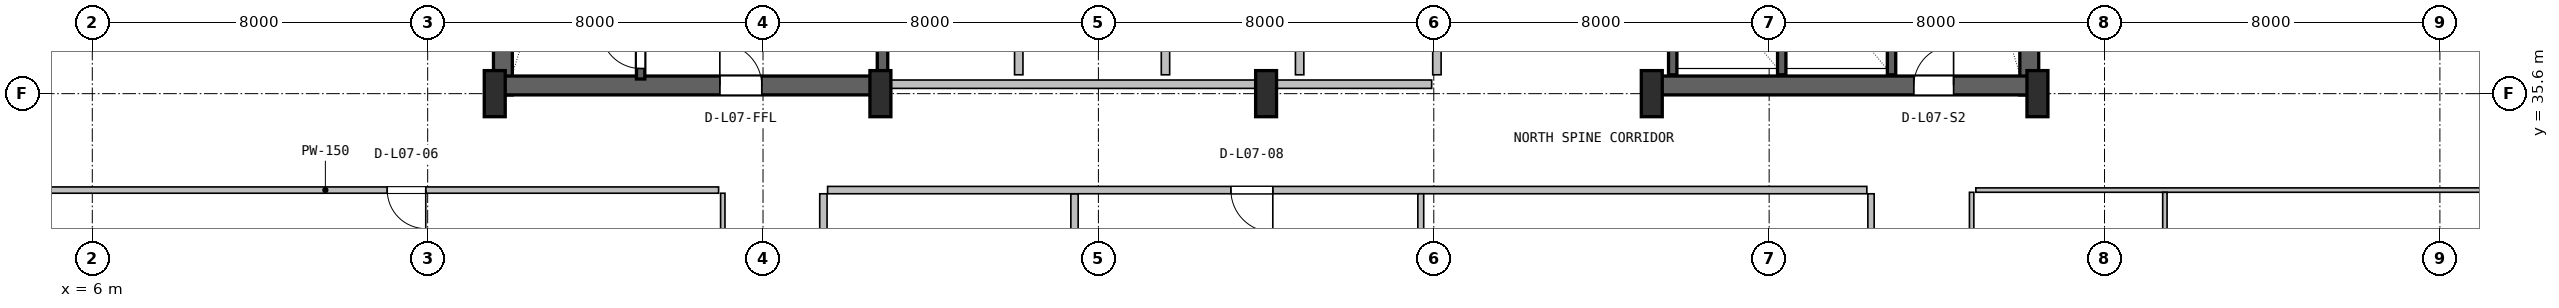
"""IFC4 building model, lengths in metres.
Left out: names, types, materials, properties, quantities, classifications, styles, units other than length and angle.
Written with IfcOpenShell. Run it as: python <this file> out.ifc"""

import sys

from ifc_helpers import new_model, si_unit, direction, frame, frame_2d, origin, origin_2d, place, context, subcontext, project, spatial, rectangle, i_section, extrude, source, transform, mapped, element, fill, save


model = new_model("IFC4")
c1 = context("Model", 3, precision=1e-05, world=origin(), true_north=direction((0.0, 1.0)))
c2 = subcontext(c1, "Body", "Model", "MODEL_VIEW")
j1 = project(units=[si_unit("LENGTHUNIT", "METRE"), si_unit("PLANEANGLEUNIT", "RADIAN")], contexts=[c1])
p1 = place(None, origin())
s1 = spatial("IfcSite", under=j1, at=p1, CompositionType="ELEMENT")
p2 = place(p1, origin())
s2 = spatial("IfcBuilding", under=s1, at=p2, CompositionType="ELEMENT")
p3 = place(p2, frame((0.0, 0.0, 35.4)))
s3 = spatial("IfcBuildingStorey", under=s2, at=p3, CompositionType="ELEMENT", Elevation=35.4)
for number, where, z_axis, x_axis in (
    (1, (15.795, 35.57, 0.0), (0.0, 0.0, 1.0), (0.0, 1.0, 0.0)),
    (2, (52.205, 35.57, 0.0), (0.0, 0.0, 1.0), (0.0, 1.0, 0.0)),
):
    element("IfcWall", number, at=place(p3, frame(where, z_axis=z_axis, x_axis=x_axis)), inside=s3, PredefinedType="SHEAR", context=c2, shape_type="SweptSolid", body=[
        extrude(rectangle(XDim=11.23, YDim=0.45, at=frame_2d((5.615, 0.0))), origin(), (0.0, 0.0, 1.0), 3.65),
    ])
p4 = place(p3, frame((15.57, 35.795, 0.0), z_axis=(0.0, 0.0, 1.0), x_axis=(1.0, 0.0, 0.0)))
e3 = element("IfcWall", 3, at=p4, inside=s3, PredefinedType="SHEAR", context=c2, shape_type="SweptSolid", body=[
    extrude(rectangle(XDim=9.23, YDim=0.45, at=frame_2d((4.615, 0.0))), origin(), (0.0, 0.0, 1.0), 3.65),
])
p5 = place(p4, frame((5.4, 0.0, 0.0)))
e4 = element("IfcOpeningElement", 4, at=p5, cuts=e3, PredefinedType="OPENING", context=c2, shape_type="SweptSolid", body=[
    extrude(rectangle(XDim=1.0, YDim=2.1, at=frame_2d((0.5, 1.05))), frame((0.0, 0.235, 0.0), z_axis=(0.0, -1.0, 0.0), x_axis=(1.0, 0.0, 0.0)), (0.0, 0.0, 1.0), 0.47),
])
p6 = place(p3, frame((43.2, 35.795, 0.0), z_axis=(0.0, 0.0, 1.0), x_axis=(1.0, 0.0, 0.0)))
e5 = element("IfcWall", 5, at=p6, inside=s3, PredefinedType="SHEAR", context=c2, shape_type="SweptSolid", body=[
    extrude(rectangle(XDim=9.23, YDim=0.45, at=frame_2d((4.615, 0.0))), origin(), (0.0, 0.0, 1.0), 3.65),
])
p7 = place(p6, frame((6.25, 0.0, 0.0)))
e6 = element("IfcOpeningElement", 6, at=p7, cuts=e5, PredefinedType="OPENING", context=c2, shape_type="SweptSolid", body=[
    extrude(rectangle(XDim=0.95, YDim=2.1, at=frame_2d((0.475, 1.05))), frame((0.0, 0.235, 0.0), z_axis=(0.0, -1.0, 0.0), x_axis=(1.0, 0.0, 0.0)), (0.0, 0.0, 1.0), 0.47),
])
m1 = source(origin(), c2, "Body", "SweptSolid", [
    extrude(i_section(OverallWidth=0.5, OverallDepth=1.1, WebThickness=0.018, FlangeThickness=0.032, FilletRadius=0.018, at=origin_2d()), origin(), (0.0, 0.0, 1.0), 3.9),
])
for number, where, z_axis, x_axis in (
    (7, (15.6, 35.6, 0.0), (0.0, 0.0, 1.0), (1.0, 0.0, 0.0)),
    (8, (24.8, 35.6, 0.0), (0.0, 0.0, 1.0), (1.0, 0.0, 0.0)),
    (9, (34.0, 35.6, 0.0), (0.0, 0.0, 1.0), (1.0, 0.0, 0.0)),
    (10, (43.2, 35.6, 0.0), (0.0, 0.0, 1.0), (1.0, 0.0, 0.0)),
    (11, (52.4, 35.6, 0.0), (0.0, 0.0, 1.0), (1.0, 0.0, 0.0)),
):
    element("IfcColumn", number, at=place(p3, frame(where, z_axis=z_axis, x_axis=x_axis)), inside=s3, PredefinedType="COLUMN", context=c2, shape_type="MappedRepresentation", body=[
        mapped(m1, transform((0.0, 0.0, 0.0), x_axis=(1.0, 0.0, 0.0), y_axis=(0.0, 1.0, 0.0), z_axis=(0.0, 0.0, 1.0), scale=1.0)),
    ])
p8 = place(p3, frame((19.08, 35.95, 0.0), z_axis=(0.0, 0.0, 1.0), x_axis=(0.0, 1.0, 0.0)))
e12 = element("IfcWall", 12, at=p8, inside=s3, PredefinedType="SHEAR", context=c2, shape_type="SweptSolid", body=[
    extrude(rectangle(XDim=9.65, YDim=0.2, at=frame_2d((4.825, 0.0))), origin(), (0.0, 0.0, 1.0), 3.65),
])
p9 = place(p8, frame((0.25, 0.0, 0.0)))
e13 = element("IfcOpeningElement", 13, at=p9, cuts=e12, PredefinedType="OPENING", context=c2, shape_type="SweptSolid", body=[
    extrude(rectangle(XDim=0.95, YDim=2.1, at=frame_2d((0.475, 1.05))), frame((0.0, 0.11, 0.0), z_axis=(0.0, -1.0, 0.0), x_axis=(1.0, 0.0, 0.0)), (0.0, 0.0, 1.0), 0.22),
])
p10 = place(p3, frame((24.85, 36.05, 0.0), z_axis=(0.0, 0.0, 1.0), x_axis=(0.0, 1.0, 0.0)))
e14 = element("IfcWall", 14, at=p10, inside=s3, PredefinedType="SHEAR", context=c2, shape_type="SweptSolid", body=[
    extrude(rectangle(XDim=10.45, YDim=0.25, at=frame_2d((5.225, 0.0))), origin(), (0.0, 0.0, 1.0), 3.65),
])
p11 = place(p3, frame((48.92, 36.05, 0.0), z_axis=(0.0, 0.0, 1.0), x_axis=(0.0, 1.0, 0.0)))
e15 = element("IfcWall", 15, at=p11, inside=s3, PredefinedType="SHEAR", context=c2, shape_type="SweptSolid", body=[
    extrude(rectangle(XDim=10.5, YDim=0.2, at=frame_2d((5.25, 0.0))), origin(), (0.0, 0.0, 1.0), 3.65),
])
for number, where, z_axis, x_axis in (
    (16, (43.7, 36.05, 0.0), (0.0, 0.0, 1.0), (0.0, 1.0, 0.0)),
    (17, (46.3, 36.05, 0.0), (0.0, 0.0, 1.0), (0.0, 1.0, 0.0)),
):
    element("IfcWall", number, at=place(p3, frame(where, z_axis=z_axis, x_axis=x_axis)), inside=s3, PredefinedType="SHEAR", context=c2, shape_type="SweptSolid", body=[
        extrude(rectangle(XDim=3.05, YDim=0.2, at=frame_2d((1.525, 0.0))), origin(), (0.0, 0.0, 1.0), 3.65),
    ])
p12 = place(p3, frame((25.0, 35.825, 0.0), z_axis=(0.0, 0.0, 1.0), x_axis=(1.0, 0.0, 0.0)))
e18 = element("IfcWall", 18, at=p12, inside=s3, PredefinedType="SOLIDWALL", context=c2, shape_type="SweptSolid", body=[
    extrude(rectangle(XDim=12.95, YDim=0.2, at=frame_2d((6.475, 0.0))), origin(), (0.0, 0.0, 1.0), 2.425),
])
for number, where, z_axis, x_axis in (
    (19, (28.1, 36.05, 0.0), (0.0, 0.0, 1.0), (0.0, 1.0, 0.0)),
    (20, (31.6, 36.05, 0.0), (0.0, 0.0, 1.0), (0.0, 1.0, 0.0)),
):
    element("IfcWall", number, at=place(p3, frame(where, z_axis=z_axis, x_axis=x_axis)), inside=s3, PredefinedType="PLUMBINGWALL", context=c2, shape_type="SweptSolid", body=[
        extrude(rectangle(XDim=3.1, YDim=0.2, at=frame_2d((1.55, 0.0))), origin(), (0.0, 0.0, 1.0), 3.63),
    ])
for number, where, z_axis, x_axis in (
    (21, (34.8, 36.05, 0.0), (0.0, 0.0, 1.0), (0.0, 1.0, 0.0)),
    (22, (38.075, 36.05, 0.0), (0.0, 0.0, 1.0), (0.0, 1.0, 0.0)),
):
    element("IfcWall", number, at=place(p3, frame(where, z_axis=z_axis, x_axis=x_axis)), inside=s3, PredefinedType="SOLIDWALL", context=c2, shape_type="SweptSolid", body=[
        extrude(rectangle(XDim=3.1, YDim=0.2, at=frame_2d((1.55, 0.0))), origin(), (0.0, 0.0, 1.0), 3.63),
    ])
p13 = place(p3, frame((21.04, 2.55, 0.0), z_axis=(0.0, 0.0, 1.0), x_axis=(0.0, 1.0, 0.0)))
e23 = element("IfcWall", 23, at=p13, inside=s3, PredefinedType="PARTITIONING", context=c2, shape_type="SweptSolid", body=[
    extrude(rectangle(XDim=30.675, YDim=0.105, at=frame_2d((15.337, 0.0))), origin(), (0.0, 0.0, 1.0), 3.322),
])
p14 = place(p13, frame((8.575, 0.0, 0.0)))
e24 = element("IfcOpeningElement", 24, at=p14, cuts=e23, PredefinedType="OPENING", context=c2, shape_type="SweptSolid", body=[
    extrude(rectangle(XDim=0.88, YDim=2.06, at=frame_2d((0.44, 1.03))), frame((0.0, 0.062, 0.0), z_axis=(0.0, -1.0, 0.0), x_axis=(1.0, 0.0, 0.0)), (0.0, 0.0, 1.0), 0.125),
])
p15 = place(p3, frame((2.18, 33.3, 0.0), z_axis=(0.0, 0.0, 1.0), x_axis=(1.0, 0.0, 0.0)))
e25 = element("IfcWall", 25, at=p15, inside=s3, PredefinedType="PARTITIONING", context=c2, shape_type="SweptSolid", body=[
    extrude(rectangle(XDim=18.76, YDim=0.15, at=frame_2d((9.38, 0.0))), origin(), (0.0, 0.0, 1.0), 3.208),
])
p16 = place(p15, frame((10.855, 0.0, 0.0)))
e26 = element("IfcOpeningElement", 26, at=p16, cuts=e25, PredefinedType="OPENING", context=c2, shape_type="SweptSolid", body=[
    extrude(rectangle(XDim=0.92, YDim=2.08, at=frame_2d((0.46, 1.04))), frame((0.0, 0.085, 0.0), z_axis=(0.0, -1.0, 0.0), x_axis=(1.0, 0.0, 0.0)), (0.0, 0.0, 1.0), 0.17),
])
p17 = place(p3, frame((29.43, 1.38, 0.0), z_axis=(0.0, 0.0, 1.0), x_axis=(0.0, 1.0, 0.0)))
e27 = element("IfcWall", 27, at=p17, inside=s3, PredefinedType="PARTITIONING", context=c2, shape_type="SweptSolid", body=[
    extrude(rectangle(XDim=31.832, YDim=0.175, at=frame_2d((15.916, 0.0))), origin(), (0.0, 0.0, 1.0), 2.852),
])
p18 = place(p3, frame((23.54, 33.3, 0.0), z_axis=(0.0, 0.0, 1.0), x_axis=(1.0, 0.0, 0.0)))
e28 = element("IfcWall", 28, at=p18, inside=s3, PredefinedType="PARTITIONING", context=c2, shape_type="SweptSolid", body=[
    extrude(rectangle(XDim=24.79, YDim=0.175, at=frame_2d((12.395, 0.0))), origin(), (0.0, 0.0, 1.0), 2.852),
])
p19 = place(p18, frame((9.62, 0.0, 0.0)))
e29 = element("IfcOpeningElement", 29, at=p19, cuts=e28, PredefinedType="OPENING", context=c2, shape_type="SweptSolid", body=[
    extrude(rectangle(XDim=1.0, YDim=2.1, at=frame_2d((0.5, 1.05))), frame((0.0, 0.098, 0.0), z_axis=(0.0, -1.0, 0.0), x_axis=(1.0, 0.0, 0.0)), (0.0, 0.0, 1.0), 0.195),
])
p20 = place(p3, frame((23.44, 1.38, 0.0), z_axis=(0.0, 0.0, 1.0), x_axis=(0.0, 1.0, 0.0)))
e30 = element("IfcWall", 30, at=p20, inside=s3, PredefinedType="PARTITIONING", context=c2, shape_type="SweptSolid", body=[
    extrude(rectangle(XDim=31.832, YDim=0.175, at=frame_2d((15.916, 0.0))), origin(), (0.0, 0.0, 1.0), 3.208),
])
p21 = place(p20, frame((15.915, 0.0, 0.0)))
e31 = element("IfcOpeningElement", 31, at=p21, cuts=e30, PredefinedType="OPENING", context=c2, shape_type="SweptSolid", body=[
    extrude(rectangle(XDim=1.05, YDim=2.1, at=frame_2d((0.525, 1.05))), frame((0.0, 0.098, 0.0), z_axis=(0.0, -1.0, 0.0), x_axis=(1.0, 0.0, 0.0)), (0.0, 0.0, 1.0), 0.195),
])
p22 = place(p3, frame((37.69, 1.38, 0.0), z_axis=(0.0, 0.0, 1.0), x_axis=(0.0, 1.0, 0.0)))
e32 = element("IfcWall", 32, at=p22, inside=s3, PredefinedType="PARTITIONING", context=c2, shape_type="SweptSolid", body=[
    extrude(rectangle(XDim=31.832, YDim=0.14, at=frame_2d((15.916, 0.0))), origin(), (0.0, 0.0, 1.0), 2.852),
])
p23 = place(p3, frame((48.43, 2.55, 0.0), z_axis=(0.0, 0.0, 1.0), x_axis=(0.0, 1.0, 0.0)))
e33 = element("IfcWall", 33, at=p23, inside=s3, PredefinedType="PARTITIONING", context=c2, shape_type="SweptSolid", body=[
    extrude(rectangle(XDim=30.662, YDim=0.15, at=frame_2d((15.331, 0.0))), origin(), (0.0, 0.0, 1.0), 3.322),
])
p24 = place(p23, frame((14.885, 0.0, 0.0)))
e34 = element("IfcOpeningElement", 34, at=p24, cuts=e33, PredefinedType="OPENING", context=c2, shape_type="SweptSolid", body=[
    extrude(rectangle(XDim=0.88, YDim=2.06, at=frame_2d((0.44, 1.03))), frame((0.0, 0.085, 0.0), z_axis=(0.0, -1.0, 0.0), x_axis=(1.0, 0.0, 0.0)), (0.0, 0.0, 1.0), 0.17),
])
p25 = place(p3, frame((50.93, 33.3, 0.0), z_axis=(0.0, 0.0, 1.0), x_axis=(1.0, 0.0, 0.0)))
e35 = element("IfcWall", 35, at=p25, inside=s3, PredefinedType="PARTITIONING", context=c2, shape_type="SweptSolid", body=[
    extrude(rectangle(XDim=14.89, YDim=0.105, at=frame_2d((7.445, 0.0))), origin(), (0.0, 0.0, 1.0), 3.208),
])
p26 = place(p3, frame((55.44, 20.632, 0.0), z_axis=(0.0, 0.0, 1.0), x_axis=(0.0, 1.0, 0.0)))
e36 = element("IfcWall", 36, at=p26, inside=s3, PredefinedType="PARTITIONING", context=c2, shape_type="SweptSolid", body=[
    extrude(rectangle(XDim=12.615, YDim=0.105, at=frame_2d((6.308, 0.0))), origin(), (0.0, 0.0, 1.0), 3.322),
])
p27 = place(p3, frame((50.83, 1.38, 0.0), z_axis=(0.0, 0.0, 1.0), x_axis=(0.0, 1.0, 0.0)))
e37 = element("IfcWall", 37, at=p27, inside=s3, PredefinedType="PARTITIONING", context=c2, shape_type="SweptSolid", body=[
    extrude(rectangle(XDim=31.867, YDim=0.105, at=frame_2d((15.934, 0.0))), origin(), (0.0, 0.0, 1.0), 3.208),
])
p28 = place(p27, frame((9.69, 0.0, 0.0)))
e38 = element("IfcOpeningElement", 38, at=p28, cuts=e37, PredefinedType="OPENING", context=c2, shape_type="SweptSolid", body=[
    extrude(rectangle(XDim=0.88, YDim=2.06, at=frame_2d((0.44, 1.03))), frame((0.0, 0.062, 0.0), z_axis=(0.0, -1.0, 0.0), x_axis=(1.0, 0.0, 0.0)), (0.0, 0.0, 1.0), 0.125),
])
p29 = place(p27, frame((25.11, 0.0, 0.0)))
e39 = element("IfcOpeningElement", 39, at=p29, cuts=e37, PredefinedType="OPENING", context=c2, shape_type="SweptSolid", body=[
    extrude(rectangle(XDim=1.0, YDim=2.1, at=frame_2d((0.5, 1.05))), frame((0.0, 0.062, 0.0), z_axis=(0.0, -1.0, 0.0), x_axis=(1.0, 0.0, 0.0)), (0.0, 0.0, 1.0), 0.125),
])
m2 = source(origin(), c2, "Body", "SweptSolid", [
    extrude(rectangle(XDim=0.95, YDim=2.1, at=frame_2d((0.475, 1.05))), frame((0.0, 0.025, 0.0), z_axis=(0.0, -1.0, 0.0), x_axis=(1.0, 0.0, 0.0)), (0.0, 0.0, 1.0), 0.05),
])
p30 = place(p9, origin())
e40 = element("IfcDoor", 40, at=p30, inside=s3, OperationType="SINGLE_SWING_RIGHT", PredefinedType="DOOR", context=c2, shape_type="MappedRepresentation", body=[
    mapped(m2, transform((0.0, 0.0, 0.0), x_axis=(1.0, 0.0, 0.0), y_axis=(0.0, 1.0, 0.0), z_axis=(0.0, 0.0, 1.0), scale=1.0)),
])
fill(e13, e40)
m3 = source(origin(), c2, "Body", "SweptSolid", [
    extrude(rectangle(XDim=1.0, YDim=2.1, at=frame_2d((0.5, 1.05))), frame((0.0, 0.025, 0.0), z_axis=(0.0, -1.0, 0.0), x_axis=(1.0, 0.0, 0.0)), (0.0, 0.0, 1.0), 0.05),
])
p31 = place(p5, origin())
e41 = element("IfcDoor", 41, at=p31, inside=s3, OperationType="SINGLE_SWING_LEFT", PredefinedType="DOOR", context=c2, shape_type="MappedRepresentation", body=[
    mapped(m3, transform((0.0, 0.0, 0.0), x_axis=(1.0, 0.0, 0.0), y_axis=(0.0, 1.0, 0.0), z_axis=(0.0, 0.0, 1.0), scale=1.0)),
])
fill(e4, e41)
p32 = place(p7, origin())
e42 = element("IfcDoor", 42, at=p32, inside=s3, OperationType="SINGLE_SWING_RIGHT", PredefinedType="DOOR", context=c2, shape_type="MappedRepresentation", body=[
    mapped(m2, transform((0.0, 0.0, 0.0), x_axis=(1.0, 0.0, 0.0), y_axis=(0.0, 1.0, 0.0), z_axis=(0.0, 0.0, 1.0), scale=1.0)),
])
fill(e6, e42)
m4 = source(origin(), c2, "Body", "SweptSolid", [
    extrude(rectangle(XDim=0.92, YDim=2.08, at=frame_2d((0.46, 1.04))), frame((0.0, 0.025, 0.0), z_axis=(0.0, -1.0, 0.0), x_axis=(1.0, 0.0, 0.0)), (0.0, 0.0, 1.0), 0.05),
])
p33 = place(p16, frame((0.92, 0.0, 0.0), z_axis=(0.0, 0.0, 1.0), x_axis=(-1.0, 0.0, 0.0)))
e43 = element("IfcDoor", 43, at=p33, inside=s3, OperationType="SINGLE_SWING_RIGHT", PredefinedType="DOOR", context=c2, shape_type="MappedRepresentation", body=[
    mapped(m4, transform((0.0, 0.0, 0.0), x_axis=(1.0, 0.0, 0.0), y_axis=(0.0, 1.0, 0.0), z_axis=(0.0, 0.0, 1.0), scale=1.0)),
])
fill(e26, e43)
m5 = source(origin(), c2, "Body", "SweptSolid", [
    extrude(rectangle(XDim=1.0, YDim=2.1, at=frame_2d((0.5, 1.05))), frame((0.0, 0.025, 0.0), z_axis=(0.0, -1.0, 0.0), x_axis=(1.0, 0.0, 0.0)), (0.0, 0.0, 1.0), 0.05),
])
p34 = place(p19, frame((1.0, 0.0, 0.0), z_axis=(0.0, 0.0, 1.0), x_axis=(-1.0, 0.0, 0.0)))
e44 = element("IfcDoor", 44, at=p34, inside=s3, OperationType="SINGLE_SWING_RIGHT", PredefinedType="DOOR", context=c2, shape_type="MappedRepresentation", body=[
    mapped(m5, transform((0.0, 0.0, 0.0), x_axis=(1.0, 0.0, 0.0), y_axis=(0.0, 1.0, 0.0), z_axis=(0.0, 0.0, 1.0), scale=1.0)),
])
fill(e29, e44)
save(model, sys.argv[1])
